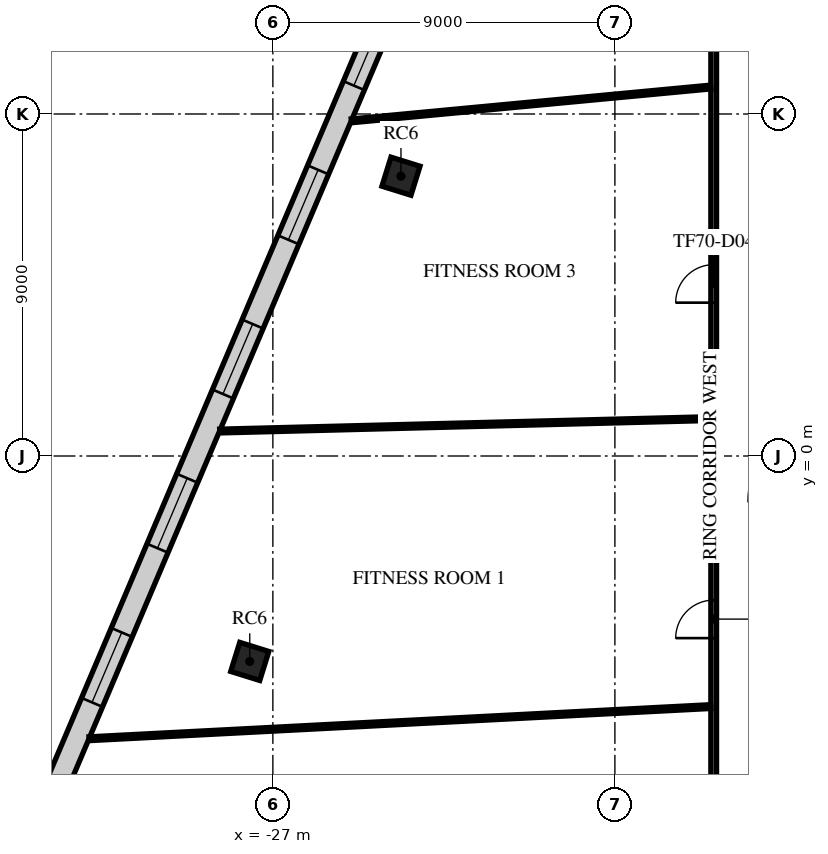
"""IFC4 building model, lengths in metres.
Left out: names, types, materials, properties, quantities, classifications, styles, units other than length and angle.
Written with IfcOpenShell. Run it as: python <this file> out.ifc"""

import sys

from ifc_helpers import new_model, si_unit, direction, frame, frame_2d, origin, origin_2d, place, context, subcontext, project, spatial, rectangle, extrude, element, fill, save


model = new_model("IFC4")
c1 = context("Model", 3, precision=1e-05, world=origin(), true_north=direction((0.0, 1.0)))
c2 = subcontext(c1, "Body", "Model", "MODEL_VIEW")
j1 = project(units=[si_unit("LENGTHUNIT", "METRE"), si_unit("PLANEANGLEUNIT", "RADIAN")], contexts=[c1])
p1 = place(None, origin())
s1 = spatial("IfcSite", under=j1, at=p1, CompositionType="ELEMENT")
p2 = place(p1, origin())
s2 = spatial("IfcBuilding", under=s1, at=p2, CompositionType="ELEMENT")
p3 = place(p2, frame((0.0, 0.0, 300.5)))
s3 = spatial("IfcBuildingStorey", under=s2, at=p3, CompositionType="ELEMENT", Elevation=300.5)
for number, where, z_axis, x_axis in (
    (1, (-23.629, 7.363, 0.0), (0.0, 0.0, 1.0), (0.298, 0.955, 0.0)),
    (2, (-27.608, -5.406, 0.0), (0.0, 0.0, 1.0), (0.298, 0.955, 0.0)),
):
    element("IfcColumn", number, at=place(p3, frame(where, z_axis=z_axis, x_axis=x_axis)), inside=s3, PredefinedType="COLUMN", context=c2, shape_type="SweptSolid", body=[
        extrude(rectangle(XDim=0.8, YDim=0.8, at=origin_2d()), origin(), (0.0, 0.0, 1.0), 4.0),
    ])
p4 = place(p3, frame((-15.005, 32.985, 0.0), z_axis=(0.0, 0.0, 1.0), x_axis=(-0.39073034436, -0.920505186295, 0.0)))
e3 = element("IfcWall", 3, at=p4, inside=s3, PredefinedType="STANDARD", context=c2, shape_type="SweptSolid", body=[
    extrude(rectangle(XDim=48.49, YDim=0.6, at=frame_2d((24.245, 0.0))), origin(), (0.0, 0.0, 1.0), 3.65),
])
p5 = place(p4, frame((1.204, 0.0, 0.9)))
e4 = element("IfcOpeningElement", 4, at=p5, cuts=e3, PredefinedType="OPENING", context=c2, shape_type="SweptSolid", body=[
    extrude(rectangle(XDim=2.0, YDim=2.1, at=frame_2d((1.0, 1.05))), frame((0.0, 0.31, 0.0), z_axis=(0.0, -1.0, 0.0), x_axis=(1.0, 0.0, 0.0)), (0.0, 0.0, 1.0), 0.62),
])
p6 = place(p4, frame((5.612, 0.0, 0.9)))
e5 = element("IfcOpeningElement", 5, at=p6, cuts=e3, PredefinedType="OPENING", context=c2, shape_type="SweptSolid", body=[
    extrude(rectangle(XDim=2.0, YDim=2.1, at=frame_2d((1.0, 1.05))), frame((0.0, 0.31, 0.0), z_axis=(0.0, -1.0, 0.0), x_axis=(1.0, 0.0, 0.0)), (0.0, 0.0, 1.0), 0.62),
])
p7 = place(p4, frame((10.021, 0.0, 0.9)))
e6 = element("IfcOpeningElement", 6, at=p7, cuts=e3, PredefinedType="OPENING", context=c2, shape_type="SweptSolid", body=[
    extrude(rectangle(XDim=2.0, YDim=2.1, at=frame_2d((1.0, 1.05))), frame((0.0, 0.31, 0.0), z_axis=(0.0, -1.0, 0.0), x_axis=(1.0, 0.0, 0.0)), (0.0, 0.0, 1.0), 0.62),
])
p8 = place(p4, frame((14.428, 0.0, 0.9)))
e7 = element("IfcOpeningElement", 7, at=p8, cuts=e3, PredefinedType="OPENING", context=c2, shape_type="SweptSolid", body=[
    extrude(rectangle(XDim=2.0, YDim=2.1, at=frame_2d((1.0, 1.05))), frame((0.0, 0.31, 0.0), z_axis=(0.0, -1.0, 0.0), x_axis=(1.0, 0.0, 0.0)), (0.0, 0.0, 1.0), 0.62),
])
p9 = place(p4, frame((18.837, 0.0, 0.9)))
e8 = element("IfcOpeningElement", 8, at=p9, cuts=e3, PredefinedType="OPENING", context=c2, shape_type="SweptSolid", body=[
    extrude(rectangle(XDim=2.0, YDim=2.1, at=frame_2d((1.0, 1.05))), frame((0.0, 0.31, 0.0), z_axis=(0.0, -1.0, 0.0), x_axis=(1.0, 0.0, 0.0)), (0.0, 0.0, 1.0), 0.62),
])
p10 = place(p4, frame((23.245, 0.0, 0.9)))
e9 = element("IfcOpeningElement", 9, at=p10, cuts=e3, PredefinedType="OPENING", context=c2, shape_type="SweptSolid", body=[
    extrude(rectangle(XDim=2.0, YDim=2.1, at=frame_2d((1.0, 1.05))), frame((0.0, 0.31, 0.0), z_axis=(0.0, -1.0, 0.0), x_axis=(1.0, 0.0, 0.0)), (0.0, 0.0, 1.0), 0.62),
])
p11 = place(p4, frame((27.653, 0.0, 0.9)))
e10 = element("IfcOpeningElement", 10, at=p11, cuts=e3, PredefinedType="OPENING", context=c2, shape_type="SweptSolid", body=[
    extrude(rectangle(XDim=2.0, YDim=2.1, at=frame_2d((1.0, 1.05))), frame((0.0, 0.31, 0.0), z_axis=(0.0, -1.0, 0.0), x_axis=(1.0, 0.0, 0.0)), (0.0, 0.0, 1.0), 0.62),
])
p12 = place(p4, frame((32.061, 0.0, 0.9)))
e11 = element("IfcOpeningElement", 11, at=p12, cuts=e3, PredefinedType="OPENING", context=c2, shape_type="SweptSolid", body=[
    extrude(rectangle(XDim=2.0, YDim=2.1, at=frame_2d((1.0, 1.05))), frame((0.0, 0.31, 0.0), z_axis=(0.0, -1.0, 0.0), x_axis=(1.0, 0.0, 0.0)), (0.0, 0.0, 1.0), 0.62),
])
p13 = place(p4, frame((36.469, 0.0, 0.9)))
e12 = element("IfcOpeningElement", 12, at=p13, cuts=e3, PredefinedType="OPENING", context=c2, shape_type="SweptSolid", body=[
    extrude(rectangle(XDim=2.0, YDim=2.1, at=frame_2d((1.0, 1.05))), frame((0.0, 0.31, 0.0), z_axis=(0.0, -1.0, 0.0), x_axis=(1.0, 0.0, 0.0)), (0.0, 0.0, 1.0), 0.62),
])
p14 = place(p4, frame((40.877, 0.0, 0.9)))
e13 = element("IfcOpeningElement", 13, at=p14, cuts=e3, PredefinedType="OPENING", context=c2, shape_type="SweptSolid", body=[
    extrude(rectangle(XDim=2.0, YDim=2.1, at=frame_2d((1.0, 1.05))), frame((0.0, 0.31, 0.0), z_axis=(0.0, -1.0, 0.0), x_axis=(1.0, 0.0, 0.0)), (0.0, 0.0, 1.0), 0.62),
])
p15 = place(p4, frame((45.285, 0.0, 0.9)))
e14 = element("IfcOpeningElement", 14, at=p15, cuts=e3, PredefinedType="OPENING", context=c2, shape_type="SweptSolid", body=[
    extrude(rectangle(XDim=2.0, YDim=2.1, at=frame_2d((1.0, 1.05))), frame((0.0, 0.31, 0.0), z_axis=(0.0, -1.0, 0.0), x_axis=(1.0, 0.0, 0.0)), (0.0, 0.0, 1.0), 0.62),
])
p16 = place(p3, frame((-15.4, -12.4, 0.0), z_axis=(0.0, 0.0, 1.0), x_axis=(0.0, 1.0, 0.0)))
e15 = element("IfcWall", 15, at=p16, inside=s3, PredefinedType="PARTITIONING", context=c2, shape_type="SweptSolid", body=[
    extrude(rectangle(XDim=27.8, YDim=0.15, at=frame_2d((13.9, 0.0))), origin(), (0.0, 0.0, 1.0), 3.25),
])
p17 = place(p16, frame((7.608, 0.0, 0.0)))
e16 = element("IfcOpeningElement", 16, at=p17, cuts=e15, PredefinedType="OPENING", context=c2, shape_type="SweptSolid", body=[
    extrude(rectangle(XDim=1.0, YDim=2.1, at=frame_2d((0.5, 1.05))), frame((0.0, 0.085, 0.0), z_axis=(0.0, -1.0, 0.0), x_axis=(1.0, 0.0, 0.0)), (0.0, 0.0, 1.0), 0.17),
])
p18 = place(p16, frame((16.435, 0.0, 0.0)))
e17 = element("IfcOpeningElement", 17, at=p18, cuts=e15, PredefinedType="OPENING", context=c2, shape_type="SweptSolid", body=[
    extrude(rectangle(XDim=1.0, YDim=2.1, at=frame_2d((0.5, 1.05))), frame((0.0, 0.085, 0.0), z_axis=(0.0, -1.0, 0.0), x_axis=(1.0, 0.0, 0.0)), (0.0, 0.0, 1.0), 0.17),
])
p19 = place(p3, frame((-31.836, -7.44, 0.0), z_axis=(0.0, 0.0, 1.0), x_axis=(0.998664003793, 0.05167405082, 0.0)))
e18 = element("IfcWall", 18, at=p19, inside=s3, PredefinedType="PARTITIONING", context=c2, shape_type="SweptSolid", body=[
    extrude(rectangle(XDim=16.38, YDim=0.1, at=frame_2d((8.19, 0.0))), origin(), (0.0, 0.0, 1.0), 3.65),
])
p20 = place(p3, frame((-28.399, 0.657, 0.0), z_axis=(0.0, 0.0, 1.0), x_axis=(0.999679226592, 0.025326743172, 0.0)))
e19 = element("IfcWall", 19, at=p20, inside=s3, PredefinedType="PARTITIONING", context=c2, shape_type="SweptSolid", body=[
    extrude(rectangle(XDim=12.927, YDim=0.1, at=frame_2d((6.463, 0.0))), origin(), (0.0, 0.0, 1.0), 3.25),
])
p21 = place(p3, frame((-24.934, 8.819, 0.0), z_axis=(0.0, 0.0, 1.0), x_axis=(0.995594865602, 0.0937596053, 0.0)))
e20 = element("IfcWall", 20, at=p21, inside=s3, PredefinedType="PARTITIONING", context=c2, shape_type="SweptSolid", body=[
    extrude(rectangle(XDim=9.496, YDim=0.1, at=frame_2d((4.748, 0.0))), origin(), (0.0, 0.0, 1.0), 3.65),
])
p22 = place(p10, origin())
e21 = element("IfcWindow", 21, at=p22, inside=s3, PartitioningType="SINGLE_PANEL", PredefinedType="WINDOW", context=c2, shape_type="SweptSolid", body=[
    extrude(rectangle(XDim=2.0, YDim=2.1, at=frame_2d((1.0, 1.05))), frame((0.0, 0.03, 0.0), z_axis=(0.0, -1.0, 0.0), x_axis=(1.0, 0.0, 0.0)), (0.0, 0.0, 1.0), 0.06),
])
fill(e9, e21)
p23 = place(p11, origin())
e22 = element("IfcWindow", 22, at=p23, inside=s3, PartitioningType="SINGLE_PANEL", PredefinedType="WINDOW", context=c2, shape_type="SweptSolid", body=[
    extrude(rectangle(XDim=2.0, YDim=2.1, at=frame_2d((1.0, 1.05))), frame((0.0, 0.03, 0.0), z_axis=(0.0, -1.0, 0.0), x_axis=(1.0, 0.0, 0.0)), (0.0, 0.0, 1.0), 0.06),
])
fill(e10, e22)
p24 = place(p12, origin())
e23 = element("IfcWindow", 23, at=p24, inside=s3, PartitioningType="SINGLE_PANEL", PredefinedType="WINDOW", context=c2, shape_type="SweptSolid", body=[
    extrude(rectangle(XDim=2.0, YDim=2.1, at=frame_2d((1.0, 1.05))), frame((0.0, 0.03, 0.0), z_axis=(0.0, -1.0, 0.0), x_axis=(1.0, 0.0, 0.0)), (0.0, 0.0, 1.0), 0.06),
])
fill(e11, e23)
p25 = place(p13, origin())
e24 = element("IfcWindow", 24, at=p25, inside=s3, PartitioningType="SINGLE_PANEL", PredefinedType="WINDOW", context=c2, shape_type="SweptSolid", body=[
    extrude(rectangle(XDim=2.0, YDim=2.1, at=frame_2d((1.0, 1.05))), frame((0.0, 0.03, 0.0), z_axis=(0.0, -1.0, 0.0), x_axis=(1.0, 0.0, 0.0)), (0.0, 0.0, 1.0), 0.06),
])
fill(e12, e24)
p26 = place(p14, origin())
e25 = element("IfcWindow", 25, at=p26, inside=s3, PartitioningType="SINGLE_PANEL", PredefinedType="WINDOW", context=c2, shape_type="SweptSolid", body=[
    extrude(rectangle(XDim=2.0, YDim=2.1, at=frame_2d((1.0, 1.05))), frame((0.0, 0.03, 0.0), z_axis=(0.0, -1.0, 0.0), x_axis=(1.0, 0.0, 0.0)), (0.0, 0.0, 1.0), 0.06),
])
fill(e13, e25)
p27 = place(p17, origin())
e26 = element("IfcDoor", 26, at=p27, inside=s3, OperationType="SINGLE_SWING_RIGHT", PredefinedType="DOOR", context=c2, shape_type="SweptSolid", body=[
    extrude(rectangle(XDim=1.0, YDim=2.1, at=frame_2d((0.5, 1.05))), frame((0.0, 0.025, 0.0), z_axis=(0.0, -1.0, 0.0), x_axis=(1.0, 0.0, 0.0)), (0.0, 0.0, 1.0), 0.05),
])
fill(e16, e26)
p28 = place(p18, origin())
e27 = element("IfcDoor", 27, at=p28, inside=s3, OperationType="SINGLE_SWING_LEFT", PredefinedType="DOOR", context=c2, shape_type="SweptSolid", body=[
    extrude(rectangle(XDim=1.0, YDim=2.1, at=frame_2d((0.5, 1.05))), frame((0.0, 0.025, 0.0), z_axis=(0.0, -1.0, 0.0), x_axis=(1.0, 0.0, 0.0)), (0.0, 0.0, 1.0), 0.05),
])
fill(e17, e27)
save(model, sys.argv[1])
